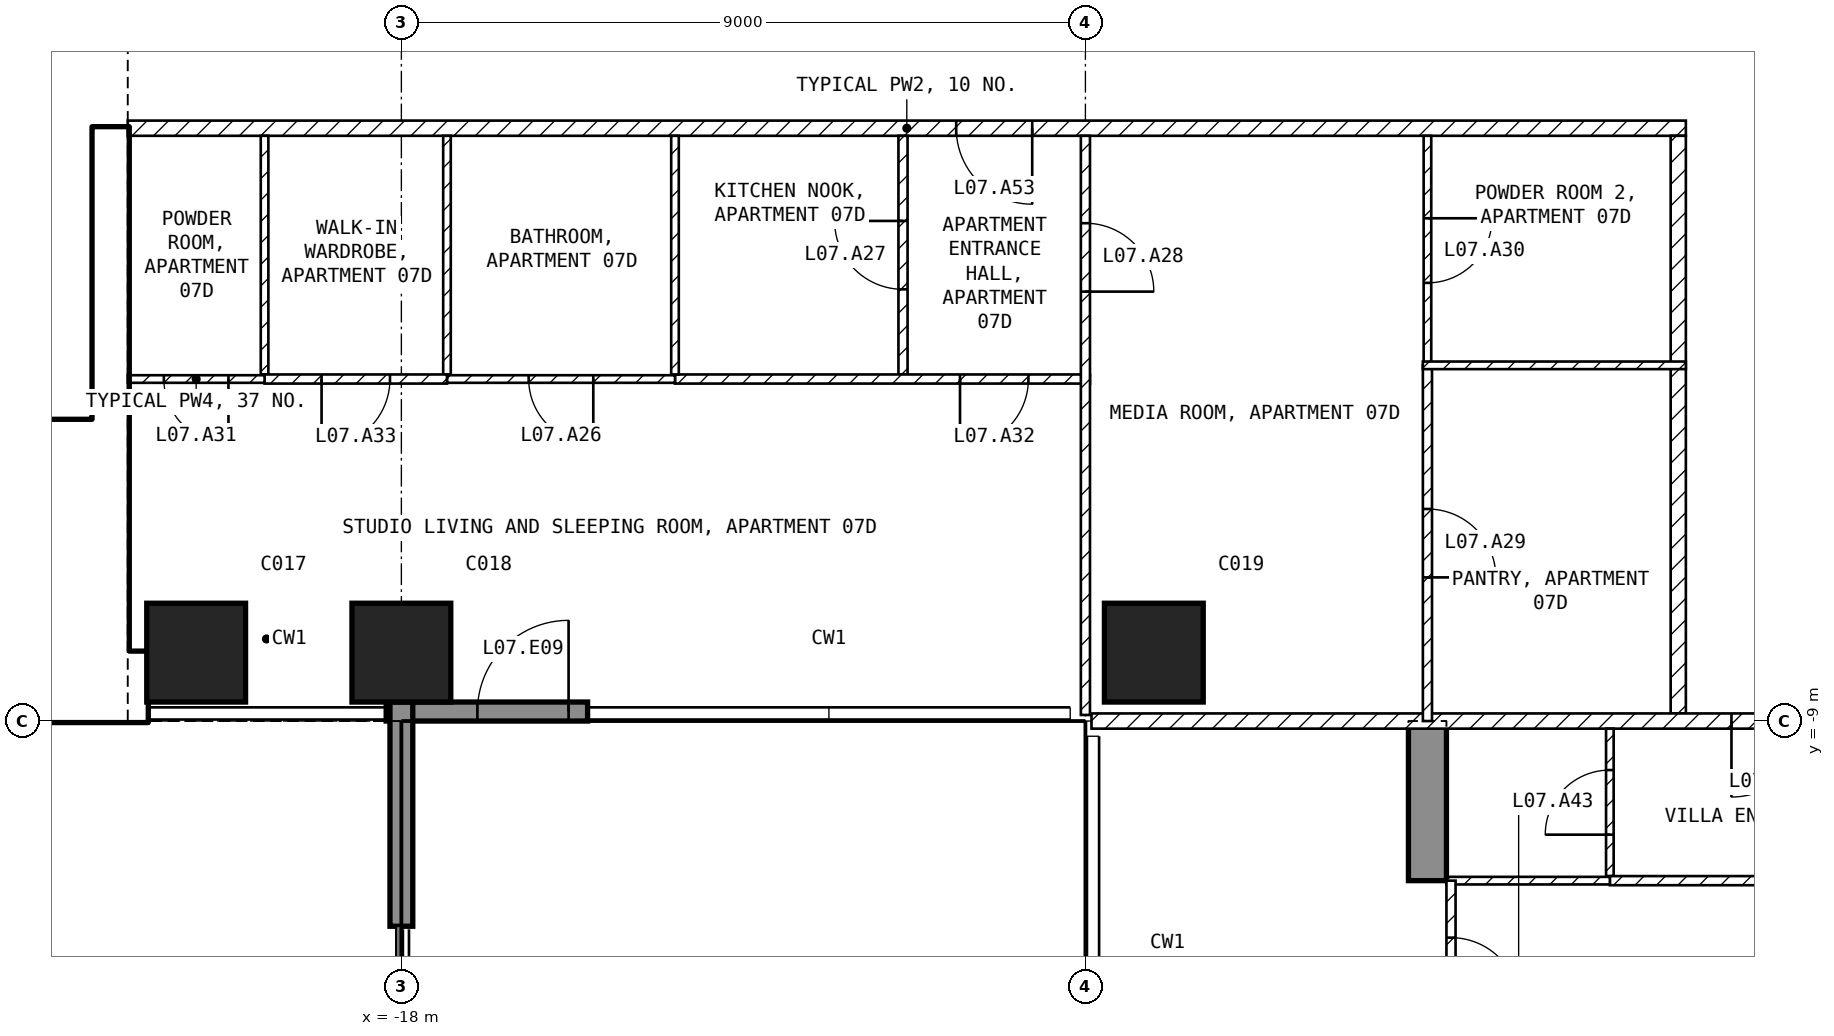
"""IFC4 building model, lengths in metres.
Left out: names, types, materials, properties, quantities, classifications, styles, units other than length and angle.
Written with IfcOpenShell. Run it as: python <this file> out.ifc"""

import sys

from ifc_helpers import new_model, si_unit, direction, frame, frame_2d, origin, origin_2d, place, context, subcontext, project, spatial, polyline, rectangle, outline, extrude, element, fill, save


model = new_model("IFC4")
c1 = context("Model", 3, precision=1e-05, world=origin(), true_north=direction((0.0, 1.0)))
c2 = subcontext(c1, "Body", "Model", "MODEL_VIEW")
j1 = project(units=[si_unit("LENGTHUNIT", "METRE"), si_unit("PLANEANGLEUNIT", "RADIAN")], contexts=[c1])
p1 = place(None, origin())
s1 = spatial("IfcSite", under=j1, at=p1, CompositionType="ELEMENT")
p2 = place(p1, origin())
s2 = spatial("IfcBuilding", under=s1, at=p2, CompositionType="ELEMENT")
p3 = place(p2, frame((0.0, 0.0, 43.5)))
s3 = spatial("IfcBuildingStorey", under=s2, at=p3, CompositionType="ELEMENT", Elevation=43.5)
for number, where, z_axis, x_axis in (
    (1, (-20.7, -8.1, -0.25), (0.0, 0.0, 1.0), (1.0, 0.0, 0.0)),
    (2, (-18.0, -8.1, -0.25), (0.0, 0.0, 1.0), (1.0, 0.0, 0.0)),
    (3, (-8.1, -8.1, -0.25), (0.0, 0.0, 1.0), (1.0, 0.0, 0.0)),
):
    element("IfcColumn", number, at=place(p3, frame(where, z_axis=z_axis, x_axis=x_axis)), inside=s3, PredefinedType="COLUMN", context=c2, shape_type="SweptSolid", body=[
        extrude(rectangle(XDim=1.3, YDim=1.3, at=origin_2d()), origin(), (0.0, 0.0, 1.0), 3.5),
    ])
p4 = place(p3, frame((-4.75, -25.45, -0.25), z_axis=(1.0, 0.0, 0.0), x_axis=(0.0, 1.0, 0.0)))
e4 = element("IfcWall", 4, at=p4, inside=s3, PredefinedType="SHEAR", context=c2, shape_type="SweptSolid", body=[
    extrude(outline(polyline([(0.0, 0.0), (4.15, 0.0), (4.15, 2.65), (6.55, 2.65), (6.55, 0.0), (11.95, 0.0), (11.95, 2.65), (14.35, 2.65), (14.35, 0.0), (16.45, 0.0), (16.45, 3.5), (0.0, 3.5), (0.0, 0.0)])), origin(), (0.0, 0.0, 1.0), 0.5),
])
p5 = place(p3, frame((-18.2, -8.875, 0.0), z_axis=(0.0, 0.0, 1.0), x_axis=(1.0, 0.0, 0.0)))
e5 = element("IfcWall", 5, at=p5, inside=s3, PredefinedType="SOLIDWALL", context=c2, shape_type="SweptSolid", body=[
    extrude(rectangle(XDim=2.65, YDim=0.25, at=frame_2d((1.325, 0.0))), origin(), (0.0, 0.0, 1.0), 3.25),
])
p6 = place(p5, frame((1.2, 0.0, 0.0)))
e6 = element("IfcOpeningElement", 6, at=p6, cuts=e5, PredefinedType="OPENING", context=c2, shape_type="SweptSolid", body=[
    extrude(rectangle(XDim=1.2, YDim=2.4, at=frame_2d((0.6, 1.2))), frame((0.0, 0.135, 0.0), z_axis=(0.0, -1.0, 0.0), x_axis=(1.0, 0.0, 0.0)), (0.0, 0.0, 1.0), 0.27),
])
p7 = place(p3, frame((-18.0, -8.75, 0.0), z_axis=(0.0, 0.0, 1.0), x_axis=(0.0, -1.0, 0.0)))
e7 = element("IfcWall", 7, at=p7, inside=s3, PredefinedType="SOLIDWALL", context=c2, shape_type="SweptSolid", body=[
    extrude(rectangle(XDim=2.95, YDim=0.3, at=frame_2d((1.475, 0.0))), origin(), (0.0, 0.0, 1.0), 3.25),
])
p8 = place(p3, frame((-32.4, -8.55, 0.0), z_axis=(0.0, 0.0, 1.0), x_axis=(1.0, 0.0, 0.0)))
e8 = element("IfcWall", 8, at=p8, inside=s3, PredefinedType="SHEAR", context=c2, shape_type="SweptSolid", body=[
    extrude(rectangle(XDim=11.05, YDim=0.9, at=frame_2d((5.525, 0.0))), origin(), (0.0, 0.0, 1.0), 3.25),
])
p9 = place(p3, frame((-21.825, -8.1, 0.0), z_axis=(0.0, 0.0, 1.0), x_axis=(0.0, 1.0, 0.0)))
e9 = element("IfcWall", 9, at=p9, inside=s3, PredefinedType="SHEAR", context=c2, shape_type="SweptSolid", body=[
    extrude(rectangle(XDim=6.9, YDim=0.45, at=frame_2d((3.45, 0.0))), origin(), (0.0, 0.0, 1.0), 3.25),
])
p10 = place(p3, frame((-28.35, -5.15, 0.0), z_axis=(0.0, 0.0, 1.0), x_axis=(1.0, 0.0, 0.0)))
e10 = element("IfcWall", 10, at=p10, inside=s3, PredefinedType="SOLIDWALL", context=c2, shape_type="SweptSolid", body=[
    extrude(rectangle(XDim=6.3, YDim=0.2, at=frame_2d((3.15, 0.0))), origin(), (0.0, 0.0, 1.0), 3.25),
])
p11 = place(p10, frame((5.1, 0.0, 0.0)))
e11 = element("IfcOpeningElement", 11, at=p11, cuts=e10, PredefinedType="OPENING", context=c2, shape_type="SweptSolid", body=[
    extrude(rectangle(XDim=1.0, YDim=2.1, at=frame_2d((0.5, 1.05))), frame((0.0, 0.11, 0.0), z_axis=(0.0, -1.0, 0.0), x_axis=(1.0, 0.0, 0.0)), (0.0, 0.0, 1.0), 0.22),
])
p12 = place(p3, frame((-1.1, -1.2, 0.0), z_axis=(0.0, 0.0, 1.0), x_axis=(-1.0, 0.0, 0.0)))
e12 = element("IfcWall", 12, at=p12, inside=s3, PredefinedType="PARTITIONING", context=c2, shape_type="SweptSolid", body=[
    extrude(rectangle(XDim=20.5, YDim=0.2, at=frame_2d((10.25, 0.0))), origin(), (0.0, 0.0, 1.0), 3.25),
])
p13 = place(p12, frame((8.6, 0.0, 0.0)))
e13 = element("IfcOpeningElement", 13, at=p13, cuts=e12, PredefinedType="OPENING", context=c2, shape_type="SweptSolid", body=[
    extrude(rectangle(XDim=1.0, YDim=2.1, at=frame_2d((0.5, 1.05))), frame((0.0, 0.11, 0.0), z_axis=(0.0, -1.0, 0.0), x_axis=(1.0, 0.0, 0.0)), (0.0, 0.0, 1.0), 0.22),
])
p14 = place(p3, frame((-1.2, -8.9, 0.0), z_axis=(0.0, 0.0, 1.0), x_axis=(0.0, 1.0, 0.0)))
e14 = element("IfcWall", 14, at=p14, inside=s3, PredefinedType="PARTITIONING", context=c2, shape_type="SweptSolid", body=[
    extrude(rectangle(XDim=7.6, YDim=0.2, at=frame_2d((3.8, 0.0))), origin(), (0.0, 0.0, 1.0), 3.25),
])
p15 = place(p3, frame((8.92, -9.0, 0.0), z_axis=(0.0, 0.0, 1.0), x_axis=(-1.0, 0.0, 0.0)))
e15 = element("IfcWall", 15, at=p15, inside=s3, PredefinedType="PARTITIONING", context=c2, shape_type="SweptSolid", body=[
    extrude(rectangle(XDim=17.84, YDim=0.2, at=frame_2d((8.92, 0.0))), origin(), (0.0, 0.0, 1.0), 3.25),
])
p16 = place(p15, frame((8.42, 0.0, 0.0)))
e16 = element("IfcOpeningElement", 16, at=p16, cuts=e15, PredefinedType="OPENING", context=c2, shape_type="SweptSolid", body=[
    extrude(rectangle(XDim=1.0, YDim=2.1, at=frame_2d((0.5, 1.05))), frame((0.0, 0.11, 0.0), z_axis=(0.0, -1.0, 0.0), x_axis=(1.0, 0.0, 0.0)), (0.0, 0.0, 1.0), 0.22),
])
p17 = place(p3, frame((-11.4, -4.44, 0.0), z_axis=(0.0, 0.0, 1.0), x_axis=(0.0, 1.0, 0.0)))
e17 = element("IfcWall", 17, at=p17, inside=s3, PredefinedType="PARTITIONING", context=c2, shape_type="SweptSolid", body=[
    extrude(rectangle(XDim=3.14, YDim=0.12, at=frame_2d((1.57, 0.0))), origin(), (0.0, 0.0, 1.0), 3.25),
])
p18 = place(p17, frame((1.12, 0.0, 0.0)))
e18 = element("IfcOpeningElement", 18, at=p18, cuts=e17, PredefinedType="OPENING", context=c2, shape_type="SweptSolid", body=[
    extrude(rectangle(XDim=0.9, YDim=2.1, at=frame_2d((0.45, 1.05))), frame((0.0, 0.07, 0.0), z_axis=(0.0, -1.0, 0.0), x_axis=(1.0, 0.0, 0.0)), (0.0, 0.0, 1.0), 0.14),
])
p19 = place(p3, frame((-8.94, -4.5, 0.0), z_axis=(0.0, 0.0, 1.0), x_axis=(-1.0, 0.0, 0.0)))
e19 = element("IfcWall", 19, at=p19, inside=s3, PredefinedType="PARTITIONING", context=c2, shape_type="SweptSolid", body=[
    extrude(rectangle(XDim=5.46, YDim=0.12, at=frame_2d((2.73, 0.0))), origin(), (0.0, 0.0, 1.0), 3.25),
])
p20 = place(p19, frame((0.81, 0.0, 0.0)))
e20 = element("IfcOpeningElement", 20, at=p20, cuts=e19, PredefinedType="OPENING", context=c2, shape_type="SweptSolid", body=[
    extrude(rectangle(XDim=0.9, YDim=2.1, at=frame_2d((0.45, 1.05))), frame((0.0, 0.07, 0.0), z_axis=(0.0, -1.0, 0.0), x_axis=(1.0, 0.0, 0.0)), (0.0, 0.0, 1.0), 0.14),
])
p21 = place(p3, frame((-9.0, -1.3, 0.0), z_axis=(0.0, 0.0, 1.0), x_axis=(0.0, -1.0, 0.0)))
e21 = element("IfcWall", 21, at=p21, inside=s3, PredefinedType="PARTITIONING", context=c2, shape_type="SweptSolid", body=[
    extrude(rectangle(XDim=7.62, YDim=0.12, at=frame_2d((3.81, 0.0))), origin(), (0.0, 0.0, 1.0), 3.25),
])
p22 = place(p21, frame((1.15, 0.0, 0.0)))
e22 = element("IfcOpeningElement", 22, at=p22, cuts=e21, PredefinedType="OPENING", context=c2, shape_type="SweptSolid", body=[
    extrude(rectangle(XDim=0.9, YDim=2.1, at=frame_2d((0.45, 1.05))), frame((0.0, 0.07, 0.0), z_axis=(0.0, -1.0, 0.0), x_axis=(1.0, 0.0, 0.0)), (0.0, 0.0, 1.0), 0.14),
])
for number, where, z_axis, x_axis in (
    (23, (-14.4, -4.44, 0.0), (0.0, 0.0, 1.0), (0.0, 1.0, 0.0)),
    (24, (-17.4, -4.44, 0.0), (0.0, 0.0, 1.0), (0.0, 1.0, 0.0)),
):
    element("IfcWall", number, at=place(p3, frame(where, z_axis=z_axis, x_axis=x_axis)), inside=s3, PredefinedType="PARTITIONING", context=c2, shape_type="SweptSolid", body=[
        extrude(rectangle(XDim=3.14, YDim=0.1, at=frame_2d((1.57, 0.0))), origin(), (0.0, 0.0, 1.0), 3.25),
    ])
p23 = place(p3, frame((-14.4, -4.5, 0.0), z_axis=(0.0, 0.0, 1.0), x_axis=(-1.0, 0.0, 0.0)))
e25 = element("IfcWall", 25, at=p23, inside=s3, PredefinedType="PARTITIONING", context=c2, shape_type="SweptSolid", body=[
    extrude(rectangle(XDim=3.0, YDim=0.1, at=frame_2d((1.5, 0.0))), origin(), (0.0, 0.0, 1.0), 3.25),
])
p24 = place(p23, frame((1.075, 0.0, 0.0)))
e26 = element("IfcOpeningElement", 26, at=p24, cuts=e25, PredefinedType="OPENING", context=c2, shape_type="SweptSolid", body=[
    extrude(rectangle(XDim=0.85, YDim=2.1, at=frame_2d((0.425, 1.05))), frame((0.0, 0.06, 0.0), z_axis=(0.0, -1.0, 0.0), x_axis=(1.0, 0.0, 0.0)), (0.0, 0.0, 1.0), 0.12),
])
p25 = place(p3, frame((-19.8, -4.44, 0.0), z_axis=(0.0, 0.0, 1.0), x_axis=(0.0, 1.0, 0.0)))
e27 = element("IfcWall", 27, at=p25, inside=s3, PredefinedType="PARTITIONING", context=c2, shape_type="SweptSolid", body=[
    extrude(rectangle(XDim=3.14, YDim=0.1, at=frame_2d((1.57, 0.0))), origin(), (0.0, 0.0, 1.0), 3.25),
])
p26 = place(p3, frame((-17.4, -4.5, 0.0), z_axis=(0.0, 0.0, 1.0), x_axis=(-1.0, 0.0, 0.0)))
e28 = element("IfcWall", 28, at=p26, inside=s3, PredefinedType="PARTITIONING", context=c2, shape_type="SweptSolid", body=[
    extrude(rectangle(XDim=2.4, YDim=0.12, at=frame_2d((1.2, 0.0))), origin(), (0.0, 0.0, 1.0), 3.25),
])
p27 = place(p26, frame((0.75, 0.0, 0.0)))
e29 = element("IfcOpeningElement", 29, at=p27, cuts=e28, PredefinedType="OPENING", context=c2, shape_type="SweptSolid", body=[
    extrude(rectangle(XDim=0.9, YDim=2.1, at=frame_2d((0.45, 1.05))), frame((0.0, 0.07, 0.0), z_axis=(0.0, -1.0, 0.0), x_axis=(1.0, 0.0, 0.0)), (0.0, 0.0, 1.0), 0.14),
])
p28 = place(p3, frame((-19.8, -4.5, 0.0), z_axis=(0.0, 0.0, 1.0), x_axis=(-1.0, 0.0, 0.0)))
e30 = element("IfcWall", 30, at=p28, inside=s3, PredefinedType="PARTITIONING", context=c2, shape_type="SweptSolid", body=[
    extrude(rectangle(XDim=1.8, YDim=0.1, at=frame_2d((0.9, 0.0))), origin(), (0.0, 0.0, 1.0), 3.25),
])
p29 = place(p28, frame((0.475, 0.0, 0.0)))
e31 = element("IfcOpeningElement", 31, at=p29, cuts=e30, PredefinedType="OPENING", context=c2, shape_type="SweptSolid", body=[
    extrude(rectangle(XDim=0.85, YDim=2.1, at=frame_2d((0.425, 1.05))), frame((0.0, 0.06, 0.0), z_axis=(0.0, -1.0, 0.0), x_axis=(1.0, 0.0, 0.0)), (0.0, 0.0, 1.0), 0.12),
])
p30 = place(p3, frame((-4.5, -1.3, 0.0), z_axis=(0.0, 0.0, 1.0), x_axis=(0.0, -1.0, 0.0)))
e32 = element("IfcWall", 32, at=p30, inside=s3, PredefinedType="PARTITIONING", context=c2, shape_type="SweptSolid", body=[
    extrude(rectangle(XDim=3.02, YDim=0.1, at=frame_2d((1.51, 0.0))), origin(), (0.0, 0.0, 1.0), 3.25),
])
p31 = place(p30, frame((1.085, 0.0, 0.0)))
e33 = element("IfcOpeningElement", 33, at=p31, cuts=e32, PredefinedType="OPENING", context=c2, shape_type="SweptSolid", body=[
    extrude(rectangle(XDim=0.85, YDim=2.1, at=frame_2d((0.425, 1.05))), frame((0.0, 0.06, 0.0), z_axis=(0.0, -1.0, 0.0), x_axis=(1.0, 0.0, 0.0)), (0.0, 0.0, 1.0), 0.12),
])
p32 = place(p3, frame((-4.5, -4.32, 0.0), z_axis=(0.0, 0.0, 1.0), x_axis=(0.0, -1.0, 0.0)))
e34 = element("IfcWall", 34, at=p32, inside=s3, PredefinedType="PARTITIONING", context=c2, shape_type="SweptSolid", body=[
    extrude(rectangle(XDim=4.68, YDim=0.12, at=frame_2d((2.34, 0.0))), origin(), (0.0, 0.0, 1.0), 3.25),
])
p33 = place(p32, frame((1.89, 0.0, 0.0)))
e35 = element("IfcOpeningElement", 35, at=p33, cuts=e34, PredefinedType="OPENING", context=c2, shape_type="SweptSolid", body=[
    extrude(rectangle(XDim=0.9, YDim=2.1, at=frame_2d((0.45, 1.05))), frame((0.0, 0.07, 0.0), z_axis=(0.0, -1.0, 0.0), x_axis=(1.0, 0.0, 0.0)), (0.0, 0.0, 1.0), 0.14),
])
p34 = place(p3, frame((-1.1, -4.32, 0.0), z_axis=(0.0, 0.0, 1.0), x_axis=(-1.0, 0.0, 0.0)))
e36 = element("IfcWall", 36, at=p34, inside=s3, PredefinedType="PARTITIONING", context=c2, shape_type="SweptSolid", body=[
    extrude(rectangle(XDim=3.46, YDim=0.1, at=frame_2d((1.73, 0.0))), origin(), (0.0, 0.0, 1.0), 3.25),
])
p35 = place(p3, frame((-2.1, -11.04, 0.0), z_axis=(0.0, 0.0, 1.0), x_axis=(0.0, 1.0, 0.0)))
e37 = element("IfcWall", 37, at=p35, inside=s3, PredefinedType="PARTITIONING", context=c2, shape_type="SweptSolid", body=[
    extrude(rectangle(XDim=1.94, YDim=0.1, at=frame_2d((0.97, 0.0))), origin(), (0.0, 0.0, 1.0), 3.25),
])
p36 = place(p35, frame((0.545, 0.0, 0.0)))
e38 = element("IfcOpeningElement", 38, at=p36, cuts=e37, PredefinedType="OPENING", context=c2, shape_type="SweptSolid", body=[
    extrude(rectangle(XDim=0.85, YDim=2.1, at=frame_2d((0.425, 1.05))), frame((0.0, 0.06, 0.0), z_axis=(0.0, -1.0, 0.0), x_axis=(1.0, 0.0, 0.0)), (0.0, 0.0, 1.0), 0.12),
])
p37 = place(p3, frame((4.25, -11.1, 0.0), z_axis=(0.0, 0.0, 1.0), x_axis=(-1.0, 0.0, 0.0)))
e39 = element("IfcWall", 39, at=p37, inside=s3, PredefinedType="PARTITIONING", context=c2, shape_type="SweptSolid", body=[
    extrude(rectangle(XDim=6.35, YDim=0.12, at=frame_2d((3.175, 0.0))), origin(), (0.0, 0.0, 1.0), 3.25),
])
p38 = place(p37, frame((2.725, 0.0, 0.0)))
e40 = element("IfcOpeningElement", 40, at=p38, cuts=e39, PredefinedType="OPENING", context=c2, shape_type="SweptSolid", body=[
    extrude(rectangle(XDim=0.9, YDim=2.1, at=frame_2d((0.45, 1.05))), frame((0.0, 0.07, 0.0), z_axis=(0.0, -1.0, 0.0), x_axis=(1.0, 0.0, 0.0)), (0.0, 0.0, 1.0), 0.14),
])
p39 = place(p3, frame((-2.1, -11.1, 0.0), z_axis=(0.0, 0.0, 1.0), x_axis=(-1.0, 0.0, 0.0)))
e41 = element("IfcWall", 41, at=p39, inside=s3, PredefinedType="PARTITIONING", context=c2, shape_type="SweptSolid", body=[
    extrude(rectangle(XDim=2.15, YDim=0.1, at=frame_2d((1.075, 0.0))), origin(), (0.0, 0.0, 1.0), 3.25),
])
p40 = place(p3, frame((-4.19, -11.1, 0.0), z_axis=(0.0, 0.0, 1.0), x_axis=(0.0, -1.0, 0.0)))
e42 = element("IfcWall", 42, at=p40, inside=s3, PredefinedType="PARTITIONING", context=c2, shape_type="SweptSolid", body=[
    extrude(rectangle(XDim=2.4, YDim=0.12, at=frame_2d((1.2, 0.0))), origin(), (0.0, 0.0, 1.0), 2.4),
])
p41 = place(p40, frame((0.75, 0.0, 0.0)))
e43 = element("IfcOpeningElement", 43, at=p41, cuts=e42, PredefinedType="OPENING", context=c2, shape_type="SweptSolid", body=[
    extrude(rectangle(XDim=0.9, YDim=2.1, at=frame_2d((0.45, 1.05))), frame((0.0, 0.07, 0.0), z_axis=(0.0, -1.0, 0.0), x_axis=(1.0, 0.0, 0.0)), (0.0, 0.0, 1.0), 0.14),
])
p42 = place(p6, origin())
e44 = element("IfcDoor", 44, at=p42, inside=s3, OperationType="SINGLE_SWING_RIGHT", PredefinedType="DOOR", context=c2, shape_type="SweptSolid", body=[
    extrude(rectangle(XDim=1.2, YDim=2.4, at=frame_2d((0.6, 1.2))), frame((0.0, 0.025, 0.0), z_axis=(0.0, -1.0, 0.0), x_axis=(1.0, 0.0, 0.0)), (0.0, 0.0, 1.0), 0.05),
])
fill(e6, e44)
p43 = place(p11, origin())
e45 = element("IfcDoor", 45, at=p43, inside=s3, OperationType="SINGLE_SWING_LEFT", PredefinedType="DOOR", context=c2, shape_type="SweptSolid", body=[
    extrude(rectangle(XDim=1.0, YDim=2.1, at=frame_2d((0.5, 1.05))), frame((0.0, 0.025, 0.0), z_axis=(0.0, -1.0, 0.0), x_axis=(1.0, 0.0, 0.0)), (0.0, 0.0, 1.0), 0.05),
])
fill(e11, e45)
p44 = place(p24, origin())
e46 = element("IfcDoor", 46, at=p44, inside=s3, OperationType="SINGLE_SWING_LEFT", PredefinedType="DOOR", context=c2, shape_type="SweptSolid", body=[
    extrude(rectangle(XDim=0.85, YDim=2.1, at=frame_2d((0.425, 1.05))), frame((0.0, 0.025, 0.0), z_axis=(0.0, -1.0, 0.0), x_axis=(1.0, 0.0, 0.0)), (0.0, 0.0, 1.0), 0.05),
])
fill(e26, e46)
p45 = place(p18, origin())
e47 = element("IfcDoor", 47, at=p45, inside=s3, OperationType="SINGLE_SWING_RIGHT", PredefinedType="DOOR", context=c2, shape_type="SweptSolid", body=[
    extrude(rectangle(XDim=0.9, YDim=2.1, at=frame_2d((0.45, 1.05))), frame((0.0, 0.025, 0.0), z_axis=(0.0, -1.0, 0.0), x_axis=(1.0, 0.0, 0.0)), (0.0, 0.0, 1.0), 0.05),
])
fill(e18, e47)
p46 = place(p22, origin())
e48 = element("IfcDoor", 48, at=p46, inside=s3, OperationType="SINGLE_SWING_RIGHT", PredefinedType="DOOR", context=c2, shape_type="SweptSolid", body=[
    extrude(rectangle(XDim=0.9, YDim=2.1, at=frame_2d((0.45, 1.05))), frame((0.0, 0.025, 0.0), z_axis=(0.0, -1.0, 0.0), x_axis=(1.0, 0.0, 0.0)), (0.0, 0.0, 1.0), 0.05),
])
fill(e22, e48)
p47 = place(p33, origin())
e49 = element("IfcDoor", 49, at=p47, inside=s3, OperationType="SINGLE_SWING_RIGHT", PredefinedType="DOOR", context=c2, shape_type="SweptSolid", body=[
    extrude(rectangle(XDim=0.9, YDim=2.1, at=frame_2d((0.45, 1.05))), frame((0.0, 0.025, 0.0), z_axis=(0.0, -1.0, 0.0), x_axis=(1.0, 0.0, 0.0)), (0.0, 0.0, 1.0), 0.05),
])
fill(e35, e49)
p48 = place(p31, origin())
e50 = element("IfcDoor", 50, at=p48, inside=s3, OperationType="SINGLE_SWING_LEFT", PredefinedType="DOOR", context=c2, shape_type="SweptSolid", body=[
    extrude(rectangle(XDim=0.85, YDim=2.1, at=frame_2d((0.425, 1.05))), frame((0.0, 0.025, 0.0), z_axis=(0.0, -1.0, 0.0), x_axis=(1.0, 0.0, 0.0)), (0.0, 0.0, 1.0), 0.05),
])
fill(e33, e50)
p49 = place(p29, origin())
e51 = element("IfcDoor", 51, at=p49, inside=s3, OperationType="SINGLE_SWING_LEFT", PredefinedType="DOOR", context=c2, shape_type="SweptSolid", body=[
    extrude(rectangle(XDim=0.85, YDim=2.1, at=frame_2d((0.425, 1.05))), frame((0.0, 0.025, 0.0), z_axis=(0.0, -1.0, 0.0), x_axis=(1.0, 0.0, 0.0)), (0.0, 0.0, 1.0), 0.05),
])
fill(e31, e51)
p50 = place(p20, origin())
e52 = element("IfcDoor", 52, at=p50, inside=s3, OperationType="SINGLE_SWING_RIGHT", PredefinedType="DOOR", context=c2, shape_type="SweptSolid", body=[
    extrude(rectangle(XDim=0.9, YDim=2.1, at=frame_2d((0.45, 1.05))), frame((0.0, 0.025, 0.0), z_axis=(0.0, -1.0, 0.0), x_axis=(1.0, 0.0, 0.0)), (0.0, 0.0, 1.0), 0.05),
])
fill(e20, e52)
p51 = place(p27, origin())
e53 = element("IfcDoor", 53, at=p51, inside=s3, OperationType="SINGLE_SWING_RIGHT", PredefinedType="DOOR", context=c2, shape_type="SweptSolid", body=[
    extrude(rectangle(XDim=0.9, YDim=2.1, at=frame_2d((0.45, 1.05))), frame((0.0, 0.025, 0.0), z_axis=(0.0, -1.0, 0.0), x_axis=(1.0, 0.0, 0.0)), (0.0, 0.0, 1.0), 0.05),
])
fill(e29, e53)
p52 = place(p16, origin())
e54 = element("IfcDoor", 54, at=p52, inside=s3, OperationType="SINGLE_SWING_RIGHT", PredefinedType="DOOR", context=c2, shape_type="SweptSolid", body=[
    extrude(rectangle(XDim=1.0, YDim=2.1, at=frame_2d((0.5, 1.05))), frame((0.0, 0.025, 0.0), z_axis=(0.0, -1.0, 0.0), x_axis=(1.0, 0.0, 0.0)), (0.0, 0.0, 1.0), 0.05),
])
fill(e16, e54)
p53 = place(p36, origin())
e55 = element("IfcDoor", 55, at=p53, inside=s3, OperationType="SINGLE_SWING_LEFT", PredefinedType="DOOR", context=c2, shape_type="SweptSolid", body=[
    extrude(rectangle(XDim=0.85, YDim=2.1, at=frame_2d((0.425, 1.05))), frame((0.0, 0.025, 0.0), z_axis=(0.0, -1.0, 0.0), x_axis=(1.0, 0.0, 0.0)), (0.0, 0.0, 1.0), 0.05),
])
fill(e38, e55)
p54 = place(p13, origin())
e56 = element("IfcDoor", 56, at=p54, inside=s3, OperationType="SINGLE_SWING_LEFT", PredefinedType="DOOR", context=c2, shape_type="SweptSolid", body=[
    extrude(rectangle(XDim=1.0, YDim=2.1, at=frame_2d((0.5, 1.05))), frame((0.0, 0.025, 0.0), z_axis=(0.0, -1.0, 0.0), x_axis=(1.0, 0.0, 0.0)), (0.0, 0.0, 1.0), 0.05),
])
fill(e13, e56)
p55 = place(p41, origin())
e57 = element("IfcDoor", 57, at=p55, inside=s3, OperationType="SINGLE_SWING_RIGHT", PredefinedType="DOOR", context=c2, shape_type="SweptSolid", body=[
    extrude(rectangle(XDim=0.9, YDim=2.1, at=frame_2d((0.45, 1.05))), frame((0.0, 0.025, 0.0), z_axis=(0.0, -1.0, 0.0), x_axis=(1.0, 0.0, 0.0)), (0.0, 0.0, 1.0), 0.05),
])
fill(e43, e57)
save(model, sys.argv[1])
